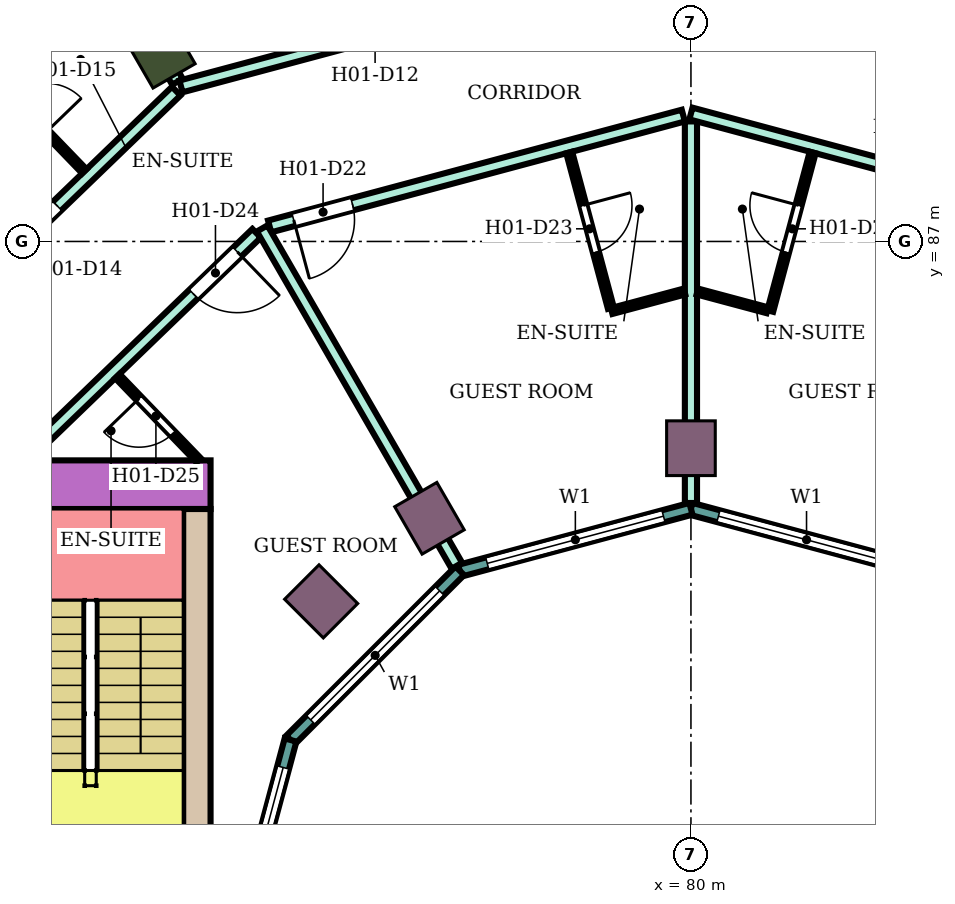
"""IFC4 building model, lengths in metres.
Left out: names, types, materials, properties, quantities, classifications, styles, units other than length and angle.
Written with IfcOpenShell. Run it as: python <this file> out.ifc"""

import sys

from ifc_helpers import new_model, si_unit, direction, frame, frame_2d, origin, origin_2d, place, context, subcontext, project, spatial, rectangle, extrude, element, fill, save


model = new_model("IFC4")
c1 = context("Model", 3, precision=1e-05, world=origin(), true_north=direction((0.0, 1.0)))
c2 = subcontext(c1, "Body", "Model", "MODEL_VIEW")
j1 = project(units=[si_unit("LENGTHUNIT", "METRE"), si_unit("PLANEANGLEUNIT", "RADIAN")], contexts=[c1])
p1 = place(None, origin())
s1 = spatial("IfcSite", under=j1, at=p1, CompositionType="ELEMENT")
p2 = place(p1, origin())
s2 = spatial("IfcBuilding", under=s1, at=p2, CompositionType="ELEMENT")
p3 = place(p2, frame((0.0, 0.0, 28.8)))
s3 = spatial("IfcBuildingStorey", under=s2, at=p3, CompositionType="ELEMENT", Elevation=28.8)
p4 = place(p3, frame((71.2, 90.242, 0.0), z_axis=(0.0, 0.0, 1.0), x_axis=(-0.5, 0.866025403784, 0.0)))
e1 = element("IfcColumn", 1, at=p4, inside=s3, PredefinedType="COLUMN", context=c2, shape_type="SweptSolid", body=[
    extrude(rectangle(XDim=1.2, YDim=0.8, at=origin_2d()), origin(), (0.0, 0.0, 1.0), 3.8),
])
for number, where, z_axis, x_axis in (
    (2, (80.0, 83.6, 0.0), (0.0, 0.0, 1.0), (0.0, 1.0, 0.0)),
    (3, (75.7, 82.448, 0.0), (0.0, 0.0, 1.0), (-0.5, 0.866, 0.0)),
    (4, (73.919, 81.081, 0.0), (0.0, 0.0, 1.0), (-0.707, 0.707, 0.0)),
):
    element("IfcColumn", number, at=place(p3, frame(where, z_axis=z_axis, x_axis=x_axis)), inside=s3, PredefinedType="COLUMN", context=c2, shape_type="SweptSolid", body=[
        extrude(rectangle(XDim=0.9, YDim=0.8, at=origin_2d()), origin(), (0.0, 0.0, 1.0), 3.8),
    ])
p5 = place(p3, frame((72.1, 83.0, 0.0), z_axis=(0.0, 0.0, 1.0), x_axis=(-1.0, 0.0, 0.0)))
e5 = element("IfcWall", 5, at=p5, inside=s3, PredefinedType="SHEAR", context=c2, shape_type="SweptSolid", body=[
    extrude(rectangle(XDim=14.7, YDim=0.8, at=frame_2d((7.35, 0.0))), origin(), (0.0, 0.0, 1.0), 3.48),
])
p6 = place(p5, frame((4.2, 0.0, 0.0)))
e6 = element("IfcOpeningElement", 6, at=p6, cuts=e5, PredefinedType="OPENING", context=c2, shape_type="SweptSolid", body=[
    extrude(rectangle(XDim=2.4, YDim=2.4, at=frame_2d((1.2, 1.2))), frame((0.0, 0.41, 0.0), z_axis=(0.0, -1.0, 0.0), x_axis=(1.0, 0.0, 0.0)), (0.0, 0.0, 1.0), 0.82),
])
p7 = place(p3, frame((71.875, 82.6, 0.0), z_axis=(0.0, 0.0, 1.0), x_axis=(0.0, -1.0, 0.0)))
e7 = element("IfcWall", 7, at=p7, inside=s3, PredefinedType="SHEAR", context=c2, shape_type="SweptSolid", body=[
    extrude(rectangle(XDim=7.6, YDim=0.45, at=frame_2d((3.8, 0.0))), origin(), (0.0, 0.0, 1.0), 3.48),
])
p8 = place(p3, frame((83.802, 81.585, 0.0), z_axis=(0.0, 0.0, 1.0), x_axis=(-0.965933654434, 0.258789828301, 0.0)))
e8 = element("IfcWall", 8, at=p8, inside=s3, PredefinedType="NOTDEFINED", context=c2, shape_type="SweptSolid", body=[
    extrude(rectangle(XDim=3.936, YDim=0.2, at=frame_2d((1.968, 0.0))), origin(), (0.0, 0.0, 1.0), 3.8),
])
p9 = place(p8, frame((0.468, 0.0, 0.9)))
e9 = element("IfcOpeningElement", 9, at=p9, cuts=e8, PredefinedType="OPENING", context=c2, shape_type="SweptSolid", body=[
    extrude(rectangle(XDim=3.0, YDim=2.3, at=frame_2d((1.5, 1.15))), frame((0.0, 0.11, 0.0), z_axis=(0.0, -1.0, 0.0), x_axis=(1.0, 0.0, 0.0)), (0.0, 0.0, 1.0), 0.22),
])
p10 = place(p3, frame((80.0, 82.604, 0.0), z_axis=(0.0, 0.0, 1.0), x_axis=(-0.965933654434, -0.258789828301, 0.0)))
e10 = element("IfcWall", 10, at=p10, inside=s3, PredefinedType="NOTDEFINED", context=c2, shape_type="SweptSolid", body=[
    extrude(rectangle(XDim=3.936, YDim=0.2, at=frame_2d((1.968, 0.0))), origin(), (0.0, 0.0, 1.0), 3.8),
])
p11 = place(p10, frame((0.468, 0.0, 0.9)))
e11 = element("IfcOpeningElement", 11, at=p11, cuts=e10, PredefinedType="OPENING", context=c2, shape_type="SweptSolid", body=[
    extrude(rectangle(XDim=3.0, YDim=2.3, at=frame_2d((1.5, 1.15))), frame((0.0, 0.11, 0.0), z_axis=(0.0, -1.0, 0.0), x_axis=(1.0, 0.0, 0.0)), (0.0, 0.0, 1.0), 0.22),
])
p12 = place(p3, frame((76.198, 81.585, 0.0), z_axis=(0.0, 0.0, 1.0), x_axis=(-0.707106781187, -0.707106781187, 0.0)))
e12 = element("IfcWall", 12, at=p12, inside=s3, PredefinedType="NOTDEFINED", context=c2, shape_type="SweptSolid", body=[
    extrude(rectangle(XDim=3.936, YDim=0.2, at=frame_2d((1.968, 0.0))), origin(), (0.0, 0.0, 1.0), 3.8),
])
p13 = place(p12, frame((0.468, 0.0, 0.9)))
e13 = element("IfcOpeningElement", 13, at=p13, cuts=e12, PredefinedType="OPENING", context=c2, shape_type="SweptSolid", body=[
    extrude(rectangle(XDim=3.0, YDim=2.3, at=frame_2d((1.5, 1.15))), frame((0.0, 0.11, 0.0), z_axis=(0.0, -1.0, 0.0), x_axis=(1.0, 0.0, 0.0)), (0.0, 0.0, 1.0), 0.22),
])
p14 = place(p3, frame((73.415, 78.802, 0.0), z_axis=(0.0, 0.0, 1.0), x_axis=(-0.258789828301, -0.965933654434, 0.0)))
e14 = element("IfcWall", 14, at=p14, inside=s3, PredefinedType="NOTDEFINED", context=c2, shape_type="SweptSolid", body=[
    extrude(rectangle(XDim=3.936, YDim=0.2, at=frame_2d((1.968, 0.0))), origin(), (0.0, 0.0, 1.0), 3.8),
])
p15 = place(p14, frame((0.468, 0.0, 0.9)))
e15 = element("IfcOpeningElement", 15, at=p15, cuts=e14, PredefinedType="OPENING", context=c2, shape_type="SweptSolid", body=[
    extrude(rectangle(XDim=3.0, YDim=2.3, at=frame_2d((1.5, 1.15))), frame((0.0, 0.11, 0.0), z_axis=(0.0, -1.0, 0.0), x_axis=(1.0, 0.0, 0.0)), (0.0, 0.0, 1.0), 0.22),
])
p16 = place(p3, frame((66.796, 84.9, 0.0), z_axis=(0.0, 0.0, 1.0), x_axis=(0.719690131178, 0.694295409092, 0.0)))
e16 = element("IfcWall", 16, at=p16, inside=s3, PredefinedType="PARTITIONING", context=c2, shape_type="SweptSolid", body=[
    extrude(rectangle(XDim=6.585, YDim=0.2, at=frame_2d((3.293, 0.0))), origin(), (0.0, 0.0, 1.0), 3.35),
])
p17 = place(p16, frame((2.867, 0.0, 0.0)))
e17 = element("IfcOpeningElement", 17, at=p17, cuts=e16, PredefinedType="OPENING", context=c2, shape_type="SweptSolid", body=[
    extrude(rectangle(XDim=1.0, YDim=2.1, at=frame_2d((0.5, 1.05))), frame((0.0, 0.11, 0.0), z_axis=(0.0, -1.0, 0.0), x_axis=(1.0, 0.0, 0.0)), (0.0, 0.0, 1.0), 0.22),
])
p18 = place(p3, frame((67.102, 97.342, 0.0), z_axis=(0.0, 0.0, 1.0), x_axis=(0.499944680089, -0.866057340394, 0.0)))
e18 = element("IfcWall", 18, at=p18, inside=s3, PredefinedType="PARTITIONING", context=c2, shape_type="SweptSolid", body=[
    extrude(rectangle(XDim=8.908, YDim=0.2, at=frame_2d((4.454, 0.0))), origin(), (0.0, 0.0, 1.0), 3.35),
])
p19 = place(p3, frame((68.987, 83.4, 0.0), z_axis=(0.0, 0.0, 1.0), x_axis=(0.719591503389, 0.694397629784, 0.0)))
e19 = element("IfcWall", 19, at=p19, inside=s3, PredefinedType="PARTITIONING", context=c2, shape_type="SweptSolid", body=[
    extrude(rectangle(XDim=5.378, YDim=0.2, at=frame_2d((2.689, 0.0))), origin(), (0.0, 0.0, 1.0), 3.35),
])
p20 = place(p19, frame((3.938, 0.0, 0.0)))
e20 = element("IfcOpeningElement", 20, at=p20, cuts=e19, PredefinedType="OPENING", context=c2, shape_type="SweptSolid", body=[
    extrude(rectangle(XDim=1.0, YDim=2.1, at=frame_2d((0.5, 1.05))), frame((0.0, 0.11, 0.0), z_axis=(0.0, -1.0, 0.0), x_axis=(1.0, 0.0, 0.0)), (0.0, 0.0, 1.0), 0.22),
])
p21 = place(p3, frame((71.614, 89.55, 0.0), z_axis=(0.0, 0.0, 1.0), x_axis=(0.965982156828, 0.258608725086, 0.0)))
e21 = element("IfcWall", 21, at=p21, inside=s3, PredefinedType="PARTITIONING", context=c2, shape_type="SweptSolid", body=[
    extrude(rectangle(XDim=8.592, YDim=0.2, at=frame_2d((4.296, 0.0))), origin(), (0.0, 0.0, 1.0), 3.35),
])
p22 = place(p21, frame((4.865, 0.0, 0.0)))
e22 = element("IfcOpeningElement", 22, at=p22, cuts=e21, PredefinedType="OPENING", context=c2, shape_type="SweptSolid", body=[
    extrude(rectangle(XDim=1.0, YDim=2.1, at=frame_2d((0.5, 1.05))), frame((0.0, 0.11, 0.0), z_axis=(0.0, -1.0, 0.0), x_axis=(1.0, 0.0, 0.0)), (0.0, 0.0, 1.0), 0.22),
])
p23 = place(p21, frame((2.804, 0.0, 0.0)))
e23 = element("IfcOpeningElement", 23, at=p23, cuts=e21, PredefinedType="OPENING", context=c2, shape_type="SweptSolid", body=[
    extrude(rectangle(XDim=1.0, YDim=2.1, at=frame_2d((0.5, 1.05))), frame((0.0, 0.11, 0.0), z_axis=(0.0, -1.0, 0.0), x_axis=(1.0, 0.0, 0.0)), (0.0, 0.0, 1.0), 0.22),
])
p24 = place(p3, frame((73.071, 87.247, 0.0), z_axis=(0.0, 0.0, 1.0), x_axis=(0.965931651205, 0.258797305243, 0.0)))
e24 = element("IfcWall", 24, at=p24, inside=s3, PredefinedType="PARTITIONING", context=c2, shape_type="SweptSolid", body=[
    extrude(rectangle(XDim=7.043, YDim=0.2, at=frame_2d((3.521, 0.0))), origin(), (0.0, 0.0, 1.0), 3.35),
])
p25 = place(p24, frame((0.41, 0.0, 0.0)))
e25 = element("IfcOpeningElement", 25, at=p25, cuts=e24, PredefinedType="OPENING", context=c2, shape_type="SweptSolid", body=[
    extrude(rectangle(XDim=1.0, YDim=2.1, at=frame_2d((0.5, 1.05))), frame((0.0, 0.11, 0.0), z_axis=(0.0, -1.0, 0.0), x_axis=(1.0, 0.0, 0.0)), (0.0, 0.0, 1.0), 0.22),
])
p26 = place(p3, frame((72.948, 87.214, 0.0), z_axis=(0.0, 0.0, 1.0), x_axis=(0.499943524694, -0.866058007363, 0.0)))
e26 = element("IfcWall", 26, at=p26, inside=s3, PredefinedType="PARTITIONING", context=c2, shape_type="SweptSolid", body=[
    extrude(rectangle(XDim=6.405, YDim=0.2, at=frame_2d((3.203, 0.0))), origin(), (0.0, 0.0, 1.0), 3.35),
])
p27 = place(p3, frame((80.0, 82.699, 0.0), z_axis=(0.0, 0.0, 1.0), x_axis=(0.0, 1.0, 0.0)))
e27 = element("IfcWall", 27, at=p27, inside=s3, PredefinedType="PARTITIONING", context=c2, shape_type="SweptSolid", body=[
    extrude(rectangle(XDim=6.275, YDim=0.2, at=frame_2d((3.138, 0.0))), origin(), (0.0, 0.0, 1.0), 3.35),
])
p28 = place(p3, frame((80.0, 89.104, 0.0), z_axis=(0.0, 0.0, 1.0), x_axis=(0.965856548257, -0.259077455964, 0.0)))
e28 = element("IfcWall", 28, at=p28, inside=s3, PredefinedType="PARTITIONING", context=c2, shape_type="SweptSolid", body=[
    extrude(rectangle(XDim=7.173, YDim=0.2, at=frame_2d((3.586, 0.0))), origin(), (0.0, 0.0, 1.0), 3.35),
])
p29 = place(p28, frame((5.763, 0.0, 0.0)))
e29 = element("IfcOpeningElement", 29, at=p29, cuts=e28, PredefinedType="OPENING", context=c2, shape_type="SweptSolid", body=[
    extrude(rectangle(XDim=1.0, YDim=2.1, at=frame_2d((0.5, 1.05))), frame((0.0, 0.11, 0.0), z_axis=(0.0, -1.0, 0.0), x_axis=(1.0, 0.0, 0.0)), (0.0, 0.0, 1.0), 0.22),
])
p30 = place(p3, frame((80.0, 91.797, 0.0), z_axis=(0.0, 0.0, 1.0), x_axis=(0.965857042792, -0.259075612301, 0.0)))
e30 = element("IfcWall", 30, at=p30, inside=s3, PredefinedType="PARTITIONING", context=c2, shape_type="SweptSolid", body=[
    extrude(rectangle(XDim=8.602, YDim=0.2, at=frame_2d((4.301, 0.0))), origin(), (0.0, 0.0, 1.0), 3.35),
])
p31 = place(p30, frame((4.877, 0.0, 0.0)))
e31 = element("IfcOpeningElement", 31, at=p31, cuts=e30, PredefinedType="OPENING", context=c2, shape_type="SweptSolid", body=[
    extrude(rectangle(XDim=1.0, YDim=2.1, at=frame_2d((0.5, 1.05))), frame((0.0, 0.11, 0.0), z_axis=(0.0, -1.0, 0.0), x_axis=(1.0, 0.0, 0.0)), (0.0, 0.0, 1.0), 0.22),
])
p32 = place(p30, frame((2.73, 0.0, 0.0)))
e32 = element("IfcOpeningElement", 32, at=p32, cuts=e30, PredefinedType="OPENING", context=c2, shape_type="SweptSolid", body=[
    extrude(rectangle(XDim=1.1, YDim=2.1, at=frame_2d((0.55, 1.05))), frame((0.0, 0.11, 0.0), z_axis=(0.0, -1.0, 0.0), x_axis=(1.0, 0.0, 0.0)), (0.0, 0.0, 1.0), 0.22),
])
p33 = place(p3, frame((68.185, 90.06, 0.0), z_axis=(0.0, 0.0, 1.0), x_axis=(0.69446127412, -0.719530081892, 0.0)))
e33 = element("IfcWall", 33, at=p33, inside=s3, PredefinedType="PARTITIONING", context=c2, shape_type="SweptSolid", body=[
    extrude(rectangle(XDim=2.649, YDim=0.1, at=frame_2d((1.324, 0.0))), origin(), (0.0, 0.0, 1.0), 3.35),
])
p34 = place(p33, frame((0.95, 0.0, 0.0)))
e34 = element("IfcOpeningElement", 34, at=p34, cuts=e33, PredefinedType="OPENING", context=c2, shape_type="SweptSolid", body=[
    extrude(rectangle(XDim=0.8, YDim=2.1, at=frame_2d((0.4, 1.05))), frame((0.0, 0.06, 0.0), z_axis=(0.0, -1.0, 0.0), x_axis=(1.0, 0.0, 0.0)), (0.0, 0.0, 1.0), 0.12),
])
p35 = place(p3, frame((68.15, 90.096, 0.0), z_axis=(0.0, 0.0, 1.0), x_axis=(0.719669144226, 0.694317163009, 0.0)))
e35 = element("IfcWall", 35, at=p35, inside=s3, PredefinedType="PARTITIONING", context=c2, shape_type="SweptSolid", body=[
    extrude(rectangle(XDim=2.687, YDim=0.1, at=frame_2d((1.343, 0.0))), origin(), (0.0, 0.0, 1.0), 3.35),
])
p36 = place(p3, frame((70.567, 84.786, 0.0), z_axis=(0.0, 0.0, 1.0), x_axis=(0.694447472534, -0.719543402368, 0.0)))
e36 = element("IfcWall", 36, at=p36, inside=s3, PredefinedType="PARTITIONING", context=c2, shape_type="SweptSolid", body=[
    extrude(rectangle(XDim=1.926, YDim=0.1, at=frame_2d((0.963, 0.0))), origin(), (0.0, 0.0, 1.0), 3.35),
])
p37 = place(p36, frame((0.513, 0.0, 0.0)))
e37 = element("IfcOpeningElement", 37, at=p37, cuts=e36, PredefinedType="OPENING", context=c2, shape_type="SweptSolid", body=[
    extrude(rectangle(XDim=0.8, YDim=2.1, at=frame_2d((0.4, 1.05))), frame((0.0, 0.06, 0.0), z_axis=(0.0, -1.0, 0.0), x_axis=(1.0, 0.0, 0.0)), (0.0, 0.0, 1.0), 0.12),
])
p38 = place(p3, frame((77.998, 88.463, 0.0), z_axis=(0.0, 0.0, 1.0), x_axis=(0.258677737588, -0.965963678446, 0.0)))
e38 = element("IfcWall", 38, at=p38, inside=s3, PredefinedType="PARTITIONING", context=c2, shape_type="SweptSolid", body=[
    extrude(rectangle(XDim=2.649, YDim=0.1, at=frame_2d((1.325, 0.0))), origin(), (0.0, 0.0, 1.0), 3.35),
])
p39 = place(p38, frame((0.9, 0.0, 0.0)))
e39 = element("IfcOpeningElement", 39, at=p39, cuts=e38, PredefinedType="OPENING", context=c2, shape_type="SweptSolid", body=[
    extrude(rectangle(XDim=0.8, YDim=2.1, at=frame_2d((0.4, 1.05))), frame((0.0, 0.06, 0.0), z_axis=(0.0, -1.0, 0.0), x_axis=(1.0, 0.0, 0.0)), (0.0, 0.0, 1.0), 0.12),
])
p40 = place(p3, frame((78.696, 85.856, 0.0), z_axis=(0.0, 0.0, 1.0), x_axis=(0.966002513606, 0.258532674351, 0.0)))
e40 = element("IfcWall", 40, at=p40, inside=s3, PredefinedType="PARTITIONING", context=c2, shape_type="SweptSolid", body=[
    extrude(rectangle(XDim=1.24, YDim=0.1, at=frame_2d((0.62, 0.0))), origin(), (0.0, 0.0, 1.0), 3.35),
])
p41 = place(p3, frame((80.106, 86.177, 0.0), z_axis=(0.0, 0.0, 1.0), x_axis=(0.966002973184, -0.258530957139, 0.0)))
e41 = element("IfcWall", 41, at=p41, inside=s3, PredefinedType="PARTITIONING", context=c2, shape_type="SweptSolid", body=[
    extrude(rectangle(XDim=1.19, YDim=0.1, at=frame_2d((0.595, 0.0))), origin(), (0.0, 0.0, 1.0), 3.35),
])
p42 = place(p3, frame((81.304, 85.856, 0.0), z_axis=(0.0, 0.0, 1.0), x_axis=(0.25867580527, 0.965964195904, 0.0)))
e42 = element("IfcWall", 42, at=p42, inside=s3, PredefinedType="PARTITIONING", context=c2, shape_type="SweptSolid", body=[
    extrude(rectangle(XDim=2.699, YDim=0.1, at=frame_2d((1.35, 0.0))), origin(), (0.0, 0.0, 1.0), 3.35),
])
p43 = place(p42, frame((1.0, 0.0, 0.0)))
e43 = element("IfcOpeningElement", 43, at=p43, cuts=e42, PredefinedType="OPENING", context=c2, shape_type="SweptSolid", body=[
    extrude(rectangle(XDim=0.8, YDim=2.1, at=frame_2d((0.4, 1.05))), frame((0.0, 0.06, 0.0), z_axis=(0.0, -1.0, 0.0), x_axis=(1.0, 0.0, 0.0)), (0.0, 0.0, 1.0), 0.12),
])
p44 = place(p9, origin())
e44 = element("IfcWindow", 44, at=p44, inside=s3, PartitioningType="SINGLE_PANEL", PredefinedType="WINDOW", context=c2, shape_type="SweptSolid", body=[
    extrude(rectangle(XDim=3.0, YDim=2.3, at=frame_2d((1.5, 1.15))), frame((0.0, 0.03, 0.0), z_axis=(0.0, -1.0, 0.0), x_axis=(1.0, 0.0, 0.0)), (0.0, 0.0, 1.0), 0.06),
])
fill(e9, e44)
p45 = place(p11, origin())
e45 = element("IfcWindow", 45, at=p45, inside=s3, PartitioningType="SINGLE_PANEL", PredefinedType="WINDOW", context=c2, shape_type="SweptSolid", body=[
    extrude(rectangle(XDim=3.0, YDim=2.3, at=frame_2d((1.5, 1.15))), frame((0.0, 0.03, 0.0), z_axis=(0.0, -1.0, 0.0), x_axis=(1.0, 0.0, 0.0)), (0.0, 0.0, 1.0), 0.06),
])
fill(e11, e45)
p46 = place(p13, origin())
e46 = element("IfcWindow", 46, at=p46, inside=s3, PartitioningType="SINGLE_PANEL", PredefinedType="WINDOW", context=c2, shape_type="SweptSolid", body=[
    extrude(rectangle(XDim=3.0, YDim=2.3, at=frame_2d((1.5, 1.15))), frame((0.0, 0.03, 0.0), z_axis=(0.0, -1.0, 0.0), x_axis=(1.0, 0.0, 0.0)), (0.0, 0.0, 1.0), 0.06),
])
fill(e13, e46)
p47 = place(p15, origin())
e47 = element("IfcWindow", 47, at=p47, inside=s3, PartitioningType="SINGLE_PANEL", PredefinedType="WINDOW", context=c2, shape_type="SweptSolid", body=[
    extrude(rectangle(XDim=3.0, YDim=2.3, at=frame_2d((1.5, 1.15))), frame((0.0, 0.03, 0.0), z_axis=(0.0, -1.0, 0.0), x_axis=(1.0, 0.0, 0.0)), (0.0, 0.0, 1.0), 0.06),
])
fill(e15, e47)
p48 = place(p17, origin())
e48 = element("IfcDoor", 48, at=p48, inside=s3, OperationType="SINGLE_SWING_LEFT", PredefinedType="DOOR", context=c2, shape_type="SweptSolid", body=[
    extrude(rectangle(XDim=1.0, YDim=2.1, at=frame_2d((0.5, 1.05))), frame((0.0, 0.025, 0.0), z_axis=(0.0, -1.0, 0.0), x_axis=(1.0, 0.0, 0.0)), (0.0, 0.0, 1.0), 0.05),
])
fill(e17, e48)
p49 = place(p43, origin())
e49 = element("IfcDoor", 49, at=p49, inside=s3, OperationType="SINGLE_SWING_RIGHT", PredefinedType="DOOR", context=c2, shape_type="SweptSolid", body=[
    extrude(rectangle(XDim=0.8, YDim=2.1, at=frame_2d((0.4, 1.05))), frame((0.0, 0.025, 0.0), z_axis=(0.0, -1.0, 0.0), x_axis=(1.0, 0.0, 0.0)), (0.0, 0.0, 1.0), 0.05),
])
fill(e43, e49)
p50 = place(p25, frame((1.0, 0.0, 0.0), z_axis=(0.0, 0.0, 1.0), x_axis=(-1.0, 0.0, 0.0)))
e50 = element("IfcDoor", 50, at=p50, inside=s3, OperationType="SINGLE_SWING_RIGHT", PredefinedType="DOOR", context=c2, shape_type="SweptSolid", body=[
    extrude(rectangle(XDim=1.0, YDim=2.1, at=frame_2d((0.5, 1.05))), frame((0.0, 0.025, 0.0), z_axis=(0.0, -1.0, 0.0), x_axis=(1.0, 0.0, 0.0)), (0.0, 0.0, 1.0), 0.05),
])
fill(e25, e50)
p51 = place(p39, origin())
e51 = element("IfcDoor", 51, at=p51, inside=s3, OperationType="SINGLE_SWING_LEFT", PredefinedType="DOOR", context=c2, shape_type="SweptSolid", body=[
    extrude(rectangle(XDim=0.8, YDim=2.1, at=frame_2d((0.4, 1.05))), frame((0.0, 0.025, 0.0), z_axis=(0.0, -1.0, 0.0), x_axis=(1.0, 0.0, 0.0)), (0.0, 0.0, 1.0), 0.05),
])
fill(e39, e51)
p52 = place(p20, frame((1.0, 0.0, 0.0), z_axis=(0.0, 0.0, 1.0), x_axis=(-1.0, 0.0, 0.0)))
e52 = element("IfcDoor", 52, at=p52, inside=s3, OperationType="SINGLE_SWING_LEFT", PredefinedType="DOOR", context=c2, shape_type="SweptSolid", body=[
    extrude(rectangle(XDim=1.0, YDim=2.1, at=frame_2d((0.5, 1.05))), frame((0.0, 0.025, 0.0), z_axis=(0.0, -1.0, 0.0), x_axis=(1.0, 0.0, 0.0)), (0.0, 0.0, 1.0), 0.05),
])
fill(e20, e52)
p53 = place(p37, frame((0.8, 0.0, 0.0), z_axis=(0.0, 0.0, 1.0), x_axis=(-1.0, 0.0, 0.0)))
e53 = element("IfcDoor", 53, at=p53, inside=s3, OperationType="SINGLE_SWING_RIGHT", PredefinedType="DOOR", context=c2, shape_type="SweptSolid", body=[
    extrude(rectangle(XDim=0.8, YDim=2.1, at=frame_2d((0.4, 1.05))), frame((0.0, 0.025, 0.0), z_axis=(0.0, -1.0, 0.0), x_axis=(1.0, 0.0, 0.0)), (0.0, 0.0, 1.0), 0.05),
])
fill(e37, e53)
save(model, sys.argv[1])
